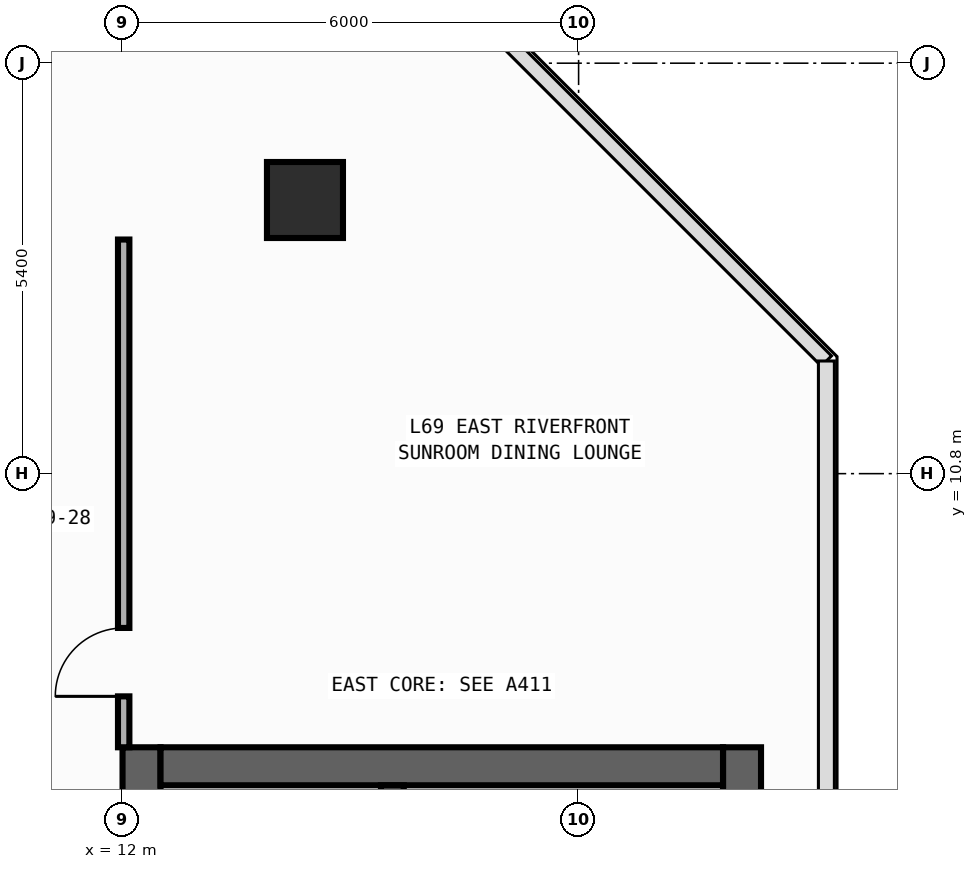
"""IFC4 building model, lengths in metres.
Left out: names, types, materials, properties, quantities, classifications, styles, units other than length and angle.
Written with IfcOpenShell. Run it as: python <this file> out.ifc"""

import sys

from ifc_helpers import new_model, si_unit, direction, frame, frame_2d, origin, origin_2d, place, context, subcontext, project, spatial, rectangle, circle, extrude, element, fill, save


model = new_model("IFC4")
c1 = context("Model", 3, precision=1e-05, world=origin(), true_north=direction((0.0, 1.0)))
c2 = subcontext(c1, "Body", "Model", "MODEL_VIEW")
j1 = project(units=[si_unit("LENGTHUNIT", "METRE"), si_unit("PLANEANGLEUNIT", "RADIAN")], contexts=[c1])
p1 = place(None, origin())
s1 = spatial("IfcSite", under=j1, at=p1, CompositionType="ELEMENT")
p2 = place(p1, origin())
s2 = spatial("IfcBuilding", under=s1, at=p2, CompositionType="ELEMENT")
p3 = place(p2, frame((0.0, 0.0, 289.0)))
s3 = spatial("IfcBuildingStorey", under=s2, at=p3, CompositionType="ELEMENT", Elevation=289.0)
p4 = place(p3, frame((12.25, -19.8, 0.0), z_axis=(0.0, 0.0, 1.0), x_axis=(0.0, 1.0, 0.0)))
e1 = element("IfcWall", 1, at=p4, inside=s3, PredefinedType="SHEAR", context=c2, shape_type="SweptSolid", body=[
    extrude(rectangle(XDim=27.0, YDim=0.5, at=frame_2d((13.5, 0.0))), origin(), (0.0, 0.0, 1.0), 3.54),
])
p5 = place(p4, frame((23.05, 0.0, 0.0)))
e2 = element("IfcOpeningElement", 2, at=p5, cuts=e1, PredefinedType="OPENING", context=c2, shape_type="SweptSolid", body=[
    extrude(rectangle(XDim=1.1, YDim=2.2, at=frame_2d((0.55, 1.1))), frame((0.0, 0.26, 0.0), z_axis=(0.0, -1.0, 0.0), x_axis=(1.0, 0.0, 0.0)), (0.0, 0.0, 1.0), 0.52),
])
p6 = place(p4, frame((19.85, 0.0, 0.0)))
e3 = element("IfcOpeningElement", 3, at=p6, cuts=e1, PredefinedType="OPENING", context=c2, shape_type="SweptSolid", body=[
    extrude(rectangle(XDim=1.1, YDim=2.2, at=frame_2d((0.55, 1.1))), frame((0.0, 0.26, 0.0), z_axis=(0.0, -1.0, 0.0), x_axis=(1.0, 0.0, 0.0)), (0.0, 0.0, 1.0), 0.52),
])
p7 = place(p4, frame((16.65, 0.0, 0.0)))
e4 = element("IfcOpeningElement", 4, at=p7, cuts=e1, PredefinedType="OPENING", context=c2, shape_type="SweptSolid", body=[
    extrude(rectangle(XDim=1.1, YDim=2.2, at=frame_2d((0.55, 1.1))), frame((0.0, 0.26, 0.0), z_axis=(0.0, -1.0, 0.0), x_axis=(1.0, 0.0, 0.0)), (0.0, 0.0, 1.0), 0.52),
])
p8 = place(p4, frame((10.175, 0.0, 0.0)))
e5 = element("IfcOpeningElement", 5, at=p8, cuts=e1, PredefinedType="OPENING", context=c2, shape_type="SweptSolid", body=[
    extrude(rectangle(XDim=0.85, YDim=2.1, at=frame_2d((0.425, 1.05))), frame((0.0, 0.26, 0.0), z_axis=(0.0, -1.0, 0.0), x_axis=(1.0, 0.0, 0.0)), (0.0, 0.0, 1.0), 0.52),
])
p9 = place(p4, frame((12.725, 0.0, 0.0)))
e6 = element("IfcOpeningElement", 6, at=p9, cuts=e1, PredefinedType="OPENING", context=c2, shape_type="SweptSolid", body=[
    extrude(rectangle(XDim=1.15, YDim=2.2, at=frame_2d((0.575, 1.1))), frame((0.0, 0.26, 0.0), z_axis=(0.0, -1.0, 0.0), x_axis=(1.0, 0.0, 0.0)), (0.0, 0.0, 1.0), 0.52),
])
p10 = place(p4, frame((25.125, 0.0, 0.0)))
e7 = element("IfcOpeningElement", 7, at=p10, cuts=e1, PredefinedType="OPENING", context=c2, shape_type="SweptSolid", body=[
    extrude(rectangle(XDim=0.85, YDim=2.1, at=frame_2d((0.425, 1.05))), frame((0.0, 0.26, 0.0), z_axis=(0.0, -1.0, 0.0), x_axis=(1.0, 0.0, 0.0)), (0.0, 0.0, 1.0), 0.52),
])
p11 = place(p3, frame((20.15, -19.8, 0.0), z_axis=(0.0, 0.0, 1.0), x_axis=(0.0, 1.0, 0.0)))
e8 = element("IfcWall", 8, at=p11, inside=s3, PredefinedType="SHEAR", context=c2, shape_type="SweptSolid", body=[
    extrude(rectangle(XDim=27.0, YDim=0.5, at=frame_2d((13.5, 0.0))), origin(), (0.0, 0.0, 1.0), 3.54),
])
p12 = place(p3, frame((12.5, 6.95, 0.0), z_axis=(0.0, 0.0, 1.0), x_axis=(1.0, 0.0, 0.0)))
e9 = element("IfcWall", 9, at=p12, inside=s3, PredefinedType="SHEAR", context=c2, shape_type="SweptSolid", body=[
    extrude(rectangle(XDim=7.4, YDim=0.5, at=frame_2d((3.7, 0.0))), origin(), (0.0, 0.0, 1.0), 3.54),
])
p13 = place(p3, frame((15.55, -19.3, 0.0), z_axis=(0.0, 0.0, 1.0), x_axis=(0.0, 1.0, 0.0)))
e10 = element("IfcWall", 10, at=p13, inside=s3, PredefinedType="SHEAR", context=c2, shape_type="SweptSolid", body=[
    extrude(rectangle(XDim=26.0, YDim=0.3, at=frame_2d((13.0, 0.0))), origin(), (0.0, 0.0, 1.0), 3.54),
])
p14 = place(p13, frame((12.225, 0.0, 0.0)))
e11 = element("IfcOpeningElement", 11, at=p14, cuts=e10, PredefinedType="OPENING", context=c2, shape_type="SweptSolid", body=[
    extrude(rectangle(XDim=1.15, YDim=2.2, at=frame_2d((0.575, 1.1))), frame((0.0, 0.16, 0.0), z_axis=(0.0, -1.0, 0.0), x_axis=(1.0, 0.0, 0.0)), (0.0, 0.0, 1.0), 0.32),
])
p15 = place(p13, frame((24.625, 0.0, 0.0)))
e12 = element("IfcOpeningElement", 12, at=p15, cuts=e10, PredefinedType="OPENING", context=c2, shape_type="SweptSolid", body=[
    extrude(rectangle(XDim=0.85, YDim=2.1, at=frame_2d((0.425, 1.05))), frame((0.0, 0.16, 0.0), z_axis=(0.0, -1.0, 0.0), x_axis=(1.0, 0.0, 0.0)), (0.0, 0.0, 1.0), 0.32),
])
p16 = place(p3, frame((14.4, 14.4, 0.0), z_axis=(0.0, 0.0, 1.0), x_axis=(1.0, 0.0, 0.0)))
e13 = element("IfcColumn", 13, at=p16, inside=s3, PredefinedType="COLUMN", context=c2, shape_type="SweptSolid", body=[
    extrude(circle(Radius=0.5, at=origin_2d()), origin(), (0.0, 0.0, 1.0), 3.8),
])
p17 = place(p3, frame((12.015, 7.2, 0.0), z_axis=(0.0, 0.0, 1.0), x_axis=(0.0, 1.0, 0.0)))
e14 = element("IfcWall", 14, at=p17, inside=s3, PredefinedType="PARTITIONING", context=c2, shape_type="SweptSolid", body=[
    extrude(rectangle(XDim=6.68, YDim=0.15, at=frame_2d((3.34, 0.0))), origin(), (0.0, 0.0, 1.0), 3.54),
])
p18 = place(p17, frame((0.67, 0.0, 0.0)))
e15 = element("IfcOpeningElement", 15, at=p18, cuts=e14, PredefinedType="OPENING", context=c2, shape_type="SweptSolid", body=[
    extrude(rectangle(XDim=0.9, YDim=2.15, at=frame_2d((0.45, 1.075))), frame((0.0, 0.085, 0.0), z_axis=(0.0, -1.0, 0.0), x_axis=(1.0, 0.0, 0.0)), (0.0, 0.0, 1.0), 0.17),
])
p19 = place(p18, origin())
e16 = element("IfcDoor", 16, at=p19, inside=s3, OperationType="SINGLE_SWING_LEFT", PredefinedType="DOOR", context=c2, shape_type="SweptSolid", body=[
    extrude(rectangle(XDim=0.9, YDim=2.15, at=frame_2d((0.45, 1.075))), frame((0.0, 0.025, 0.0), z_axis=(0.0, -1.0, 0.0), x_axis=(1.0, 0.0, 0.0)), (0.0, 0.0, 1.0), 0.05),
])
fill(e15, e16)
save(model, sys.argv[1])
